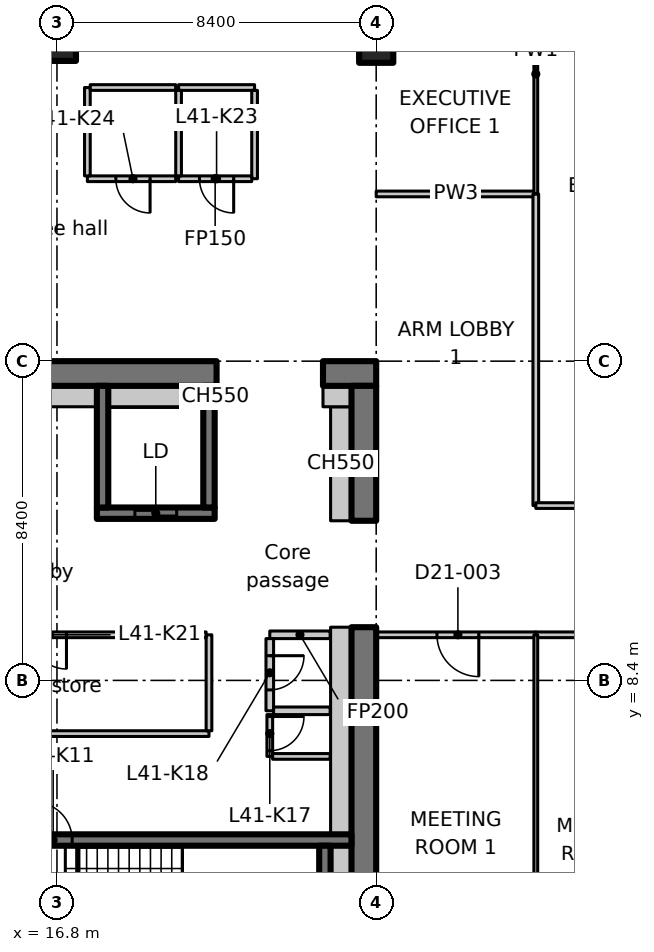
"""IFC4 building model, lengths in metres.
Left out: names, types, materials, properties, quantities, classifications, styles, units other than length and angle.
Written with IfcOpenShell. Run it as: python <this file> out.ifc"""

import sys

from ifc_helpers import new_model, si_unit, direction, frame, frame_2d, origin, origin_2d, place, context, subcontext, project, spatial, polyline, rectangle, outline, extrude, element, fill, save


model = new_model("IFC4")
c1 = context("Model", 3, precision=1e-05, world=origin(), true_north=direction((0.0, 1.0)))
c2 = subcontext(c1, "Body", "Model", "MODEL_VIEW")
j1 = project(units=[si_unit("LENGTHUNIT", "METRE"), si_unit("PLANEANGLEUNIT", "RADIAN")], contexts=[c1])
p1 = place(None, origin())
s1 = spatial("IfcSite", under=j1, at=p1, CompositionType="ELEMENT")
p2 = place(p1, origin())
s2 = spatial("IfcBuilding", under=s1, at=p2, CompositionType="ELEMENT")
p3 = place(p2, frame((0.0, 0.0, 166.8)))
s3 = spatial("IfcBuildingStorey", under=s2, at=p3, CompositionType="ELEMENT", Elevation=166.8)
p4 = place(p3, frame((16.8, 25.2, 0.0), z_axis=(0.0, 0.0, 1.0), x_axis=(1.0, 0.0, 0.0)))
e1 = element("IfcColumn", 1, at=p4, inside=s3, PredefinedType="COLUMN", context=c2, shape_type="SweptSolid", body=[
    extrude(rectangle(XDim=1.0, YDim=1.0, at=origin_2d()), origin(), (0.0, 0.0, 1.0), 3.35),
])
p5 = place(p3, frame((25.2, 25.2, 0.0), z_axis=(0.0, 0.0, 1.0), x_axis=(1.0, 0.0, 0.0)))
e2 = element("IfcColumn", 2, at=p5, inside=s3, PredefinedType="COLUMN", context=c2, shape_type="SweptSolid", body=[
    extrude(rectangle(XDim=0.9, YDim=1.1, at=origin_2d()), origin(), (0.0, 0.0, 1.0), 3.35),
])
p6 = place(p3, frame((-1.1, 16.475, 0.0), z_axis=(0.0, 0.0, 1.0), x_axis=(1.0, 0.0, 0.0)))
e3 = element("IfcWall", 3, at=p6, inside=s3, PredefinedType="SHEAR", context=c2, shape_type="SweptSolid", body=[
    extrude(rectangle(XDim=22.1, YDim=0.65, at=frame_2d((11.05, 0.0))), origin(), (0.0, 0.0, 1.0), 3.35),
])
p7 = place(p6, frame((3.15, 0.0, 0.0)))
e4 = element("IfcOpeningElement", 4, at=p7, cuts=e3, PredefinedType="OPENING", context=c2, shape_type="SweptSolid", body=[
    extrude(rectangle(XDim=1.1, YDim=2.3, at=frame_2d((0.55, 1.15))), frame((0.0, 0.335, 0.0), z_axis=(0.0, -1.0, 0.0), x_axis=(1.0, 0.0, 0.0)), (0.0, 0.0, 1.0), 0.67),
])
p8 = place(p3, frame((23.8, 16.475, 0.0), z_axis=(0.0, 0.0, 1.0), x_axis=(1.0, 0.0, 0.0)))
e5 = element("IfcWall", 5, at=p8, inside=s3, PredefinedType="SHEAR", context=c2, shape_type="SweptSolid", body=[
    extrude(rectangle(XDim=1.4, YDim=0.65, at=frame_2d((0.7, 0.0))), origin(), (0.0, 0.0, 1.0), 3.35),
])
p9 = place(p3, frame((24.875, 0.65, 0.0), z_axis=(0.0, 0.0, 1.0), x_axis=(0.0, 1.0, 0.0)))
e6 = element("IfcWall", 6, at=p9, inside=s3, PredefinedType="SHEAR", context=c2, shape_type="SweptSolid", body=[
    extrude(rectangle(XDim=9.15, YDim=0.65, at=frame_2d((4.575, 0.0))), origin(), (0.0, 0.0, 1.0), 3.35),
])
p10 = place(p3, frame((24.875, 12.6, 0.0), z_axis=(0.0, 0.0, 1.0), x_axis=(0.0, 1.0, 0.0)))
e7 = element("IfcWall", 7, at=p10, inside=s3, PredefinedType="SHEAR", context=c2, shape_type="SweptSolid", body=[
    extrude(rectangle(XDim=3.55, YDim=0.65, at=frame_2d((1.775, 0.0))), origin(), (0.0, 0.0, 1.0), 3.35),
])
p11 = place(p3, frame((24.275, 12.6, 0.0), z_axis=(0.0, 0.0, 1.0), x_axis=(0.0, 1.0, 0.0)))
e8 = element("IfcWall", 8, at=p11, inside=s3, PredefinedType="PARTITIONING", context=c2, shape_type="SweptSolid", body=[
    extrude(rectangle(XDim=3.0, YDim=0.55, at=frame_2d((1.5, 0.0))), origin(), (0.0, 0.0, 1.0), 3.35),
])
p12 = place(p3, frame((23.8, 15.875, 0.0), z_axis=(0.0, 0.0, 1.0), x_axis=(1.0, 0.0, 0.0)))
e9 = element("IfcWall", 9, at=p12, inside=s3, PredefinedType="PARTITIONING", context=c2, shape_type="SweptSolid", body=[
    extrude(rectangle(XDim=0.75, YDim=0.55, at=frame_2d((0.375, 0.0))), origin(), (0.0, 0.0, 1.0), 3.35),
])
p13 = place(p3, frame((17.85, 12.8, 0.0), z_axis=(0.0, 0.0, 1.0), x_axis=(1.0, 0.0, 0.0)))
e10 = element("IfcWall", 10, at=p13, inside=s3, PredefinedType="SHEAR", context=c2, shape_type="SweptSolid", body=[
    extrude(rectangle(XDim=3.1, YDim=0.3, at=frame_2d((1.55, 0.0))), origin(), (0.0, 0.0, 1.0), 3.35),
])
p14 = place(p13, frame((1.0, 0.0, 0.0)))
e11 = element("IfcOpeningElement", 11, at=p14, cuts=e10, PredefinedType="OPENING", context=c2, shape_type="SweptSolid", body=[
    extrude(rectangle(XDim=1.1, YDim=2.3, at=frame_2d((0.55, 1.15))), frame((0.0, 0.16, 0.0), z_axis=(0.0, -1.0, 0.0), x_axis=(1.0, 0.0, 0.0)), (0.0, 0.0, 1.0), 0.32),
])
for number, where, z_axis, x_axis in (
    (12, (18.0, 12.95, 0.0), (0.0, 0.0, 1.0), (0.0, 1.0, 0.0)),
    (13, (20.8, 12.95, 0.0), (0.0, 0.0, 1.0), (0.0, 1.0, 0.0)),
):
    element("IfcWall", number, at=place(p3, frame(where, z_axis=z_axis, x_axis=x_axis)), inside=s3, PredefinedType="SHEAR", context=c2, shape_type="SweptSolid", body=[
        extrude(rectangle(XDim=3.2, YDim=0.3, at=frame_2d((1.6, 0.0))), origin(), (0.0, 0.0, 1.0), 3.35),
    ])
p15 = place(p3, frame((15.8, 4.2, 0.0), z_axis=(0.0, 0.0, 1.0), x_axis=(1.0, 0.0, 0.0)))
e14 = element("IfcWall", 14, at=p15, inside=s3, PredefinedType="SHEAR", context=c2, shape_type="SweptSolid", body=[
    extrude(rectangle(XDim=8.75, YDim=0.3, at=frame_2d((4.375, 0.0))), origin(), (0.0, 0.0, 1.0), 3.35),
])
p16 = place(p15, frame((0.4, 0.0, 0.0)))
e15 = element("IfcOpeningElement", 15, at=p16, cuts=e14, PredefinedType="OPENING", context=c2, shape_type="SweptSolid", body=[
    extrude(rectangle(XDim=1.0, YDim=2.1, at=frame_2d((0.5, 1.05))), frame((0.0, 0.16, 0.0), z_axis=(0.0, -1.0, 0.0), x_axis=(1.0, 0.0, 0.0)), (0.0, 0.0, 1.0), 0.32),
])
p17 = place(p3, frame((23.85, 1.5, 0.0), z_axis=(0.0, 0.0, 1.0), x_axis=(0.0, 1.0, 0.0)))
e16 = element("IfcWall", 16, at=p17, inside=s3, PredefinedType="SHEAR", context=c2, shape_type="SweptSolid", body=[
    extrude(rectangle(XDim=2.55, YDim=0.3, at=frame_2d((1.275, 0.0))), origin(), (0.0, 0.0, 1.0), 3.35),
])
p18 = place(p3, frame((23.988, 9.6, 0.0), z_axis=(0.0, 0.0, 1.0), x_axis=(-1.0, 0.0, 0.0)))
e17 = element("IfcWall", 17, at=p18, inside=s3, PredefinedType="PARTITIONING", context=c2, shape_type="SweptSolid", body=[
    extrude(rectangle(XDim=1.588, YDim=0.2, at=frame_2d((0.794, 0.0))), origin(), (0.0, 0.0, 1.0), 3.35),
])
p19 = place(p3, frame((22.4, 9.5, 0.0), z_axis=(0.0, 0.0, 1.0), x_axis=(0.0, -1.0, 0.0)))
e18 = element("IfcWall", 18, at=p19, inside=s3, PredefinedType="PARTITIONING", context=c2, shape_type="SweptSolid", body=[
    extrude(rectangle(XDim=1.9, YDim=0.2, at=frame_2d((0.95, 0.0))), origin(), (0.0, 0.0, 1.0), 3.35),
])
p20 = place(p19, frame((0.45, 0.0, 0.0)))
e19 = element("IfcOpeningElement", 19, at=p20, cuts=e18, PredefinedType="OPENING", context=c2, shape_type="SweptSolid", body=[
    extrude(rectangle(XDim=0.9, YDim=2.1, at=frame_2d((0.45, 1.05))), frame((0.0, 0.11, 0.0), z_axis=(0.0, -1.0, 0.0), x_axis=(1.0, 0.0, 0.0)), (0.0, 0.0, 1.0), 0.22),
])
p21 = place(p3, frame((22.5, 7.6, 0.0), z_axis=(0.0, 0.0, 1.0), x_axis=(1.0, 0.0, 0.0)))
e20 = element("IfcWall", 20, at=p21, inside=s3, PredefinedType="PARTITIONING", context=c2, shape_type="SweptSolid", body=[
    extrude(rectangle(XDim=1.488, YDim=0.2, at=frame_2d((0.744, 0.0))), origin(), (0.0, 0.0, 1.0), 3.35),
])
p22 = place(p3, frame((12.5, 7.0, 0.0), z_axis=(0.0, 0.0, 1.0), x_axis=(1.0, 0.0, 0.0)))
e21 = element("IfcWall", 21, at=p22, inside=s3, PredefinedType="PARTITIONING", context=c2, shape_type="SweptSolid", body=[
    extrude(rectangle(XDim=8.3, YDim=0.15, at=frame_2d((4.15, 0.0))), origin(), (0.0, 0.0, 1.0), 3.35),
])
p23 = place(p3, frame((20.8, 7.075, 0.0), z_axis=(0.0, 0.0, 1.0), x_axis=(0.0, 1.0, 0.0)))
e22 = element("IfcWall", 22, at=p23, inside=s3, PredefinedType="PARTITIONING", context=c2, shape_type="SweptSolid", body=[
    extrude(rectangle(XDim=2.525, YDim=0.15, at=frame_2d((1.263, 0.0))), origin(), (0.0, 0.0, 1.0), 3.35),
])
p24 = place(p3, frame((20.725, 9.6, 0.0), z_axis=(0.0, 0.0, 1.0), x_axis=(-1.0, 0.0, 0.0)))
e23 = element("IfcWall", 23, at=p24, inside=s3, PredefinedType="PARTITIONING", context=c2, shape_type="SweptSolid", body=[
    extrude(rectangle(XDim=8.225, YDim=0.15, at=frame_2d((4.113, 0.0))), origin(), (0.0, 0.0, 1.0), 3.35),
])
p25 = place(p24, frame((3.675, 0.0, 0.0)))
e24 = element("IfcOpeningElement", 24, at=p25, cuts=e23, PredefinedType="OPENING", context=c2, shape_type="SweptSolid", body=[
    extrude(rectangle(XDim=0.9, YDim=2.1, at=frame_2d((0.45, 1.05))), frame((0.0, 0.085, 0.0), z_axis=(0.0, -1.0, 0.0), x_axis=(1.0, 0.0, 0.0)), (0.0, 0.0, 1.0), 0.17),
])
p26 = place(p3, frame((20.0, 24.0, 0.0), z_axis=(0.0, 0.0, 1.0), x_axis=(1.0, 0.0, 0.0)))
e25 = element("IfcWall", 25, at=p26, inside=s3, PredefinedType="PARTITIONING", context=c2, shape_type="SweptSolid", body=[
    extrude(rectangle(XDim=2.0, YDim=0.15, at=frame_2d((1.0, 0.0))), origin(), (0.0, 0.0, 1.0), 3.35),
])
p27 = place(p3, frame((22.0, 23.925, 0.0), z_axis=(0.0, 0.0, 1.0), x_axis=(0.0, -1.0, 0.0)))
e26 = element("IfcWall", 26, at=p27, inside=s3, PredefinedType="PARTITIONING", context=c2, shape_type="SweptSolid", body=[
    extrude(rectangle(XDim=2.325, YDim=0.15, at=frame_2d((1.163, 0.0))), origin(), (0.0, 0.0, 1.0), 3.35),
])
p28 = place(p3, frame((21.925, 21.6, 0.0), z_axis=(0.0, 0.0, 1.0), x_axis=(-1.0, 0.0, 0.0)))
e27 = element("IfcWall", 27, at=p28, inside=s3, PredefinedType="PARTITIONING", context=c2, shape_type="SweptSolid", body=[
    extrude(rectangle(XDim=1.925, YDim=0.15, at=frame_2d((0.962, 0.0))), origin(), (0.0, 0.0, 1.0), 3.35),
])
p29 = place(p28, frame((0.475, 0.0, 0.0)))
e28 = element("IfcOpeningElement", 28, at=p29, cuts=e27, PredefinedType="OPENING", context=c2, shape_type="SweptSolid", body=[
    extrude(rectangle(XDim=0.9, YDim=2.1, at=frame_2d((0.45, 1.05))), frame((0.0, 0.085, 0.0), z_axis=(0.0, -1.0, 0.0), x_axis=(1.0, 0.0, 0.0)), (0.0, 0.0, 1.0), 0.17),
])
p30 = place(p3, frame((20.0, 21.675, 0.0), z_axis=(0.0, 0.0, 1.0), x_axis=(0.0, 1.0, 0.0)))
e29 = element("IfcWall", 29, at=p30, inside=s3, PredefinedType="PARTITIONING", context=c2, shape_type="SweptSolid", body=[
    extrude(rectangle(XDim=2.25, YDim=0.15, at=frame_2d((1.125, 0.0))), origin(), (0.0, 0.0, 1.0), 3.35),
])
p31 = place(p3, frame((19.925, 21.6, 0.0), z_axis=(0.0, 0.0, 1.0), x_axis=(-1.0, 0.0, 0.0)))
e30 = element("IfcWall", 30, at=p31, inside=s3, PredefinedType="PARTITIONING", context=c2, shape_type="SweptSolid", body=[
    extrude(rectangle(XDim=2.325, YDim=0.15, at=frame_2d((1.163, 0.0))), origin(), (0.0, 0.0, 1.0), 3.35),
])
p32 = place(p31, frame((0.675, 0.0, 0.0)))
e31 = element("IfcOpeningElement", 31, at=p32, cuts=e30, PredefinedType="OPENING", context=c2, shape_type="SweptSolid", body=[
    extrude(rectangle(XDim=0.9, YDim=2.1, at=frame_2d((0.45, 1.05))), frame((0.0, 0.085, 0.0), z_axis=(0.0, -1.0, 0.0), x_axis=(1.0, 0.0, 0.0)), (0.0, 0.0, 1.0), 0.17),
])
p33 = place(p3, frame((17.6, 21.675, 0.0), z_axis=(0.0, 0.0, 1.0), x_axis=(0.0, 1.0, 0.0)))
e32 = element("IfcWall", 32, at=p33, inside=s3, PredefinedType="PARTITIONING", context=c2, shape_type="SweptSolid", body=[
    extrude(rectangle(XDim=2.325, YDim=0.15, at=frame_2d((1.163, 0.0))), origin(), (0.0, 0.0, 1.0), 3.35),
])
p34 = place(p3, frame((17.675, 24.0, 0.0), z_axis=(0.0, 0.0, 1.0), x_axis=(1.0, 0.0, 0.0)))
e33 = element("IfcWall", 33, at=p34, inside=s3, PredefinedType="PARTITIONING", context=c2, shape_type="SweptSolid", body=[
    extrude(rectangle(XDim=2.25, YDim=0.15, at=frame_2d((1.125, 0.0))), origin(), (0.0, 0.0, 1.0), 3.35),
])
p35 = place(p3, frame((22.4, 7.5, 0.0), z_axis=(0.0, 0.0, 1.0), x_axis=(0.0, -1.0, 0.0)))
e34 = element("IfcWall", 34, at=p35, inside=s3, PredefinedType="PARTITIONING", context=c2, shape_type="SweptSolid", body=[
    extrude(rectangle(XDim=1.1, YDim=0.15, at=frame_2d((0.55, 0.0))), origin(), (0.0, 0.0, 1.0), 3.35),
])
p36 = place(p35, frame((0.05, 0.0, 0.0)))
e35 = element("IfcOpeningElement", 35, at=p36, cuts=e34, PredefinedType="OPENING", context=c2, shape_type="SweptSolid", body=[
    extrude(rectangle(XDim=0.9, YDim=2.1, at=frame_2d((0.45, 1.05))), frame((0.0, 0.085, 0.0), z_axis=(0.0, -1.0, 0.0), x_axis=(1.0, 0.0, 0.0)), (0.0, 0.0, 1.0), 0.17),
])
p37 = place(p3, frame((22.475, 6.4, 0.0), z_axis=(0.0, 0.0, 1.0), x_axis=(1.0, 0.0, 0.0)))
e36 = element("IfcWall", 36, at=p37, inside=s3, PredefinedType="PARTITIONING", context=c2, shape_type="SweptSolid", body=[
    extrude(rectangle(XDim=1.513, YDim=0.15, at=frame_2d((0.756, 0.0))), origin(), (0.0, 0.0, 1.0), 3.35),
])
for number, where, z_axis, x_axis in (
    (37, (15.35, 15.875, 0.0), (0.0, 0.0, 1.0), (1.0, 0.0, 0.0)),
    (38, (18.15, 15.875, 0.0), (0.0, 0.0, 1.0), (1.0, 0.0, 0.0)),
):
    element("IfcWall", number, at=place(p3, frame(where, z_axis=z_axis, x_axis=x_axis)), inside=s3, PredefinedType="PARTITIONING", context=c2, shape_type="SweptSolid", body=[
        extrude(rectangle(XDim=2.5, YDim=0.55, at=frame_2d((1.25, 0.0))), origin(), (0.0, 0.0, 1.0), 3.35),
    ])
p38 = place(p3, frame((20.95, 15.875, 0.0), z_axis=(0.0, 0.0, 1.0), x_axis=(1.0, 0.0, 0.0)))
e39 = element("IfcWall", 39, at=p38, inside=s3, PredefinedType="PARTITIONING", context=c2, shape_type="SweptSolid", body=[
    extrude(rectangle(XDim=0.05, YDim=0.55, at=frame_2d((0.025, 0.0))), origin(), (0.0, 0.0, 1.0), 3.35),
])
p39 = place(p3, frame((24.275, 1.5, 0.0), z_axis=(0.0, 0.0, 1.0), x_axis=(0.0, 1.0, 0.0)))
e40 = element("IfcWall", 40, at=p39, inside=s3, PredefinedType="PARTITIONING", context=c2, shape_type="SweptSolid", body=[
    extrude(rectangle(XDim=2.55, YDim=0.55, at=frame_2d((1.275, 0.0))), origin(), (0.0, 0.0, 1.0), 3.35),
])
p40 = place(p3, frame((24.275, 4.35, 0.0), z_axis=(0.0, 0.0, 1.0), x_axis=(0.0, 1.0, 0.0)))
e41 = element("IfcWall", 41, at=p40, inside=s3, PredefinedType="PARTITIONING", context=c2, shape_type="SweptSolid", body=[
    extrude(rectangle(XDim=5.45, YDim=0.55, at=frame_2d((2.725, 0.0))), origin(), (0.0, 0.0, 1.0), 3.35),
])
p41 = place(p3, frame((25.2, 21.2, 0.0), z_axis=(0.0, 0.0, 1.0), x_axis=(1.0, 0.0, 0.0)))
e42 = element("IfcWall", 42, at=p41, inside=s3, PredefinedType="PARTITIONING", context=c2, shape_type="SweptSolid", body=[
    extrude(rectangle(XDim=4.2, YDim=0.15, at=frame_2d((2.1, 0.0))), origin(), (0.0, 0.0, 1.0), 3.33),
])
p42 = place(p3, frame((29.4, 9.6, 0.0), z_axis=(0.0, 0.0, 1.0), x_axis=(-1.0, 0.0, 0.0)))
e43 = element("IfcWall", 43, at=p42, inside=s3, PredefinedType="PARTITIONING", context=c2, shape_type="SweptSolid", body=[
    extrude(rectangle(XDim=4.2, YDim=0.15, at=frame_2d((2.1, 0.0))), origin(), (0.0, 0.0, 1.0), 3.33),
])
p43 = place(p42, frame((1.5, 0.0, 0.0)))
e44 = element("IfcOpeningElement", 44, at=p43, cuts=e43, PredefinedType="OPENING", context=c2, shape_type="SweptSolid", body=[
    extrude(rectangle(XDim=1.1, YDim=2.1, at=frame_2d((0.55, 1.05))), frame((0.0, 0.085, 0.0), z_axis=(0.0, -1.0, 0.0), x_axis=(1.0, 0.0, 0.0)), (0.0, 0.0, 1.0), 0.17),
])
p44 = place(p3, frame((29.4, 21.2, 0.0), z_axis=(0.0, 0.0, 1.0), x_axis=(0.0, -1.0, 0.0)))
e45 = element("IfcWall", 45, at=p44, inside=s3, PredefinedType="PARTITIONING", context=c2, shape_type="SweptSolid", body=[
    extrude(rectangle(XDim=8.2, YDim=0.15, at=frame_2d((4.1, 0.0))), origin(), (0.0, 0.0, 1.0), 3.33),
])
p45 = place(p3, frame((29.4, 27.511, 0.0), z_axis=(0.0, 0.0, 1.0), x_axis=(0.0, -1.0, 0.0)))
e46 = element("IfcWall", 46, at=p45, inside=s3, PredefinedType="PARTITIONING", context=c2, shape_type="SweptSolid", body=[
    extrude(outline(polyline([(0.0, 0.0), (6.311, 0.0), (6.311, 3.33), (2.761, 3.33), (2.759, 2.98), (1.863, 2.98), (1.861, 3.33), (0.236, 3.33), (0.0, 3.33), (0.0, 0.0)])), frame((0.0, 0.05, 0.0), z_axis=(0.0, -1.0, 0.0), x_axis=(1.0, 0.0, 0.0)), (0.0, 0.0, 1.0), 0.1),
])
for number, where, z_axis, x_axis in (
    (47, (33.6, 9.6, 0.0), (0.0, 0.0, 1.0), (-1.0, 0.0, 0.0)),
    (48, (29.4, 13.0, 0.0), (0.0, 0.0, 1.0), (1.0, 0.0, 0.0)),
):
    element("IfcWall", number, at=place(p3, frame(where, z_axis=z_axis, x_axis=x_axis)), inside=s3, PredefinedType="PARTITIONING", context=c2, shape_type="SweptSolid", body=[
        extrude(rectangle(XDim=4.2, YDim=0.15, at=frame_2d((2.1, 0.0))), origin(), (0.0, 0.0, 1.0), 3.33),
    ])
p46 = place(p3, frame((29.4, 9.6, 0.0), z_axis=(0.0, 0.0, 1.0), x_axis=(0.0, -1.0, 0.0)))
e49 = element("IfcWall", 49, at=p46, inside=s3, PredefinedType="PARTITIONING", context=c2, shape_type="SweptSolid", body=[
    extrude(outline(polyline([(0.0, 0.0), (10.774, 0.0), (10.774, 3.33), (10.7, 3.33), (10.05, 3.33), (10.048, 2.98), (9.152, 2.98), (9.15, 3.33), (0.0, 3.33), (0.0, 0.0)])), frame((0.0, 0.05, 0.0), z_axis=(0.0, -1.0, 0.0), x_axis=(1.0, 0.0, 0.0)), (0.0, 0.0, 1.0), 0.1),
])
p47 = place(p14, origin())
e50 = element("IfcDoor", 50, at=p47, inside=s3, OperationType="SLIDING_TO_LEFT", PredefinedType="DOOR", context=c2, shape_type="SweptSolid", body=[
    extrude(rectangle(XDim=1.1, YDim=2.3, at=frame_2d((0.55, 1.15))), frame((0.0, 0.025, 0.0), z_axis=(0.0, -1.0, 0.0), x_axis=(1.0, 0.0, 0.0)), (0.0, 0.0, 1.0), 0.05),
])
fill(e11, e50)
p48 = place(p16, origin())
e51 = element("IfcDoor", 51, at=p48, inside=s3, OperationType="SINGLE_SWING_LEFT", PredefinedType="DOOR", context=c2, shape_type="SweptSolid", body=[
    extrude(rectangle(XDim=1.0, YDim=2.1, at=frame_2d((0.5, 1.05))), frame((0.0, 0.025, 0.0), z_axis=(0.0, -1.0, 0.0), x_axis=(1.0, 0.0, 0.0)), (0.0, 0.0, 1.0), 0.05),
])
fill(e15, e51)
p49 = place(p36, origin())
e52 = element("IfcDoor", 52, at=p49, inside=s3, OperationType="SINGLE_SWING_LEFT", PredefinedType="DOOR", context=c2, shape_type="SweptSolid", body=[
    extrude(rectangle(XDim=0.9, YDim=2.1, at=frame_2d((0.45, 1.05))), frame((0.0, 0.025, 0.0), z_axis=(0.0, -1.0, 0.0), x_axis=(1.0, 0.0, 0.0)), (0.0, 0.0, 1.0), 0.05),
])
fill(e35, e52)
p50 = place(p20, origin())
e53 = element("IfcDoor", 53, at=p50, inside=s3, OperationType="SINGLE_SWING_RIGHT", PredefinedType="DOOR", context=c2, shape_type="SweptSolid", body=[
    extrude(rectangle(XDim=0.9, YDim=2.1, at=frame_2d((0.45, 1.05))), frame((0.0, 0.025, 0.0), z_axis=(0.0, -1.0, 0.0), x_axis=(1.0, 0.0, 0.0)), (0.0, 0.0, 1.0), 0.05),
])
fill(e19, e53)
p51 = place(p25, origin())
e54 = element("IfcDoor", 54, at=p51, inside=s3, OperationType="SINGLE_SWING_LEFT", PredefinedType="DOOR", context=c2, shape_type="SweptSolid", body=[
    extrude(rectangle(XDim=0.9, YDim=2.1, at=frame_2d((0.45, 1.05))), frame((0.0, 0.025, 0.0), z_axis=(0.0, -1.0, 0.0), x_axis=(1.0, 0.0, 0.0)), (0.0, 0.0, 1.0), 0.05),
])
fill(e24, e54)
p52 = place(p29, origin())
e55 = element("IfcDoor", 55, at=p52, inside=s3, OperationType="SINGLE_SWING_LEFT", PredefinedType="DOOR", context=c2, shape_type="SweptSolid", body=[
    extrude(rectangle(XDim=0.9, YDim=2.1, at=frame_2d((0.45, 1.05))), frame((0.0, 0.025, 0.0), z_axis=(0.0, -1.0, 0.0), x_axis=(1.0, 0.0, 0.0)), (0.0, 0.0, 1.0), 0.05),
])
fill(e28, e55)
p53 = place(p32, origin())
e56 = element("IfcDoor", 56, at=p53, inside=s3, OperationType="SINGLE_SWING_RIGHT", PredefinedType="DOOR", context=c2, shape_type="SweptSolid", body=[
    extrude(rectangle(XDim=0.9, YDim=2.1, at=frame_2d((0.45, 1.05))), frame((0.0, 0.025, 0.0), z_axis=(0.0, -1.0, 0.0), x_axis=(1.0, 0.0, 0.0)), (0.0, 0.0, 1.0), 0.05),
])
fill(e31, e56)
p54 = place(p43, origin())
e57 = element("IfcDoor", 57, at=p54, inside=s3, OperationType="SINGLE_SWING_LEFT", PredefinedType="DOOR", context=c2, shape_type="SweptSolid", body=[
    extrude(rectangle(XDim=1.1, YDim=2.1, at=frame_2d((0.55, 1.05))), frame((0.0, 0.025, 0.0), z_axis=(0.0, -1.0, 0.0), x_axis=(1.0, 0.0, 0.0)), (0.0, 0.0, 1.0), 0.05),
])
fill(e44, e57)
save(model, sys.argv[1])
